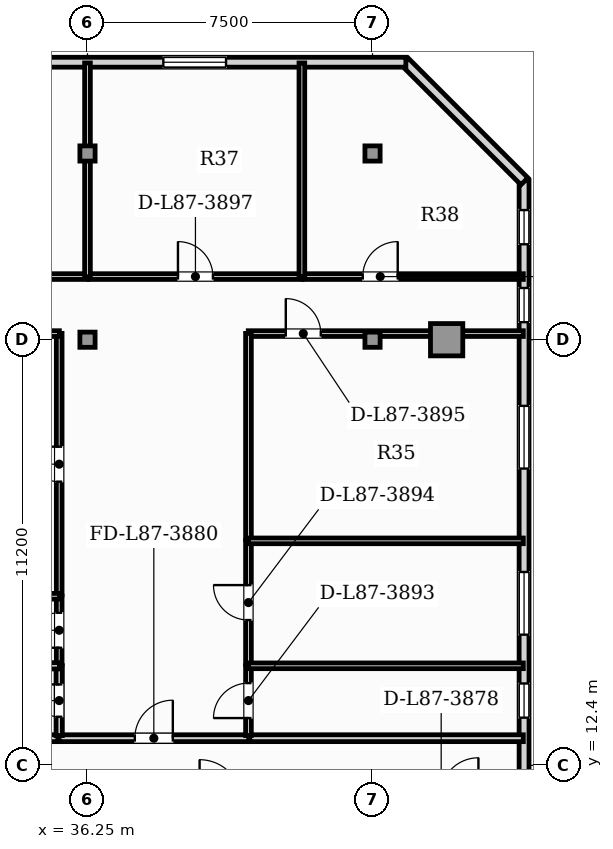
"""IFC4 building model, lengths in metres.
Left out: names, types, materials, properties, quantities, classifications, styles, units other than length and angle.
Written with IfcOpenShell. Run it as: python <this file> out.ifc"""

import sys

from ifc_helpers import new_model, si_unit, direction, frame, frame_2d, origin, origin_2d, place, context, subcontext, project, spatial, rectangle, hollow_rectangle, extrude, element, fill, save


model = new_model("IFC4")
c1 = context("Model", 3, precision=1e-05, world=origin(), true_north=direction((0.0, 1.0)))
c2 = subcontext(c1, "Body", "Model", "MODEL_VIEW")
j1 = project(units=[si_unit("LENGTHUNIT", "METRE"), si_unit("PLANEANGLEUNIT", "RADIAN")], contexts=[c1])
p1 = place(None, origin())
s1 = spatial("IfcSite", under=j1, at=p1, CompositionType="ELEMENT")
p2 = place(p1, origin())
s2 = spatial("IfcBuilding", under=s1, at=p2, CompositionType="ELEMENT")
p3 = place(p2, frame((0.0, 0.0, 353.45)))
s3 = spatial("IfcBuildingStorey", under=s2, at=p3, CompositionType="ELEMENT", Elevation=353.45)
p4 = place(p3, frame((45.7, 23.6, 0.0), z_axis=(0.0, 0.0, 1.0), x_axis=(1.0, 0.0, 0.0)))
e1 = element("IfcColumn", 1, at=p4, inside=s3, PredefinedType="USERDEFINED", context=c2, shape_type="SweptSolid", body=[
    extrude(hollow_rectangle(XDim=0.85, YDim=0.85, WallThickness=0.05, at=origin_2d()), origin(), (0.0, 0.0, 1.0), 4.4),
])
for number, where, z_axis, x_axis in (
    (2, (36.25, 23.6, 0.0), (0.0, 0.0, 1.0), (1.0, 0.0, 0.0)),
    (3, (43.75, 23.6, 0.0), (0.0, 0.0, 1.0), (1.0, 0.0, 0.0)),
    (4, (36.25, 28.5, 0.0), (0.0, 0.0, 1.0), (1.0, 0.0, 0.0)),
    (5, (43.75, 28.5, 0.0), (0.0, 0.0, 1.0), (1.0, 0.0, 0.0)),
):
    element("IfcColumn", number, at=place(p3, frame(where, z_axis=z_axis, x_axis=x_axis)), inside=s3, PredefinedType="COLUMN", context=c2, shape_type="SweptSolid", body=[
        extrude(hollow_rectangle(XDim=0.4, YDim=0.4, WallThickness=0.02, at=origin_2d()), origin(), (0.0, 0.0, 1.0), 4.4),
    ])
p5 = place(p3, frame((47.737, 3.24, 0.0), z_axis=(0.0, 0.0, 1.0), x_axis=(0.0, 1.0, 0.0)))
e6 = element("IfcWall", 6, at=p5, inside=s3, PredefinedType="SOLIDWALL", context=c2, shape_type="SweptSolid", body=[
    extrude(rectangle(XDim=24.551, YDim=0.26, at=frame_2d((12.276, 0.0))), origin(), (0.0, 0.0, 1.0), 4.14),
])
p6 = place(p5, frame((20.821, 0.0, 0.95)))
e7 = element("IfcOpeningElement", 7, at=p6, cuts=e6, PredefinedType="OPENING", context=c2, shape_type="SweptSolid", body=[
    extrude(rectangle(XDim=0.9, YDim=1.5, at=frame_2d((0.45, 0.75))), frame((0.0, 0.14, 0.0), z_axis=(0.0, -1.0, 0.0), x_axis=(1.0, 0.0, 0.0)), (0.0, 0.0, 1.0), 0.28),
])
p7 = place(p5, frame((10.415, 0.0, 0.95)))
e8 = element("IfcOpeningElement", 8, at=p7, cuts=e6, PredefinedType="OPENING", context=c2, shape_type="SweptSolid", body=[
    extrude(rectangle(XDim=0.9, YDim=1.5, at=frame_2d((0.45, 0.75))), frame((0.0, 0.14, 0.0), z_axis=(0.0, -1.0, 0.0), x_axis=(1.0, 0.0, 0.0)), (0.0, 0.0, 1.0), 0.28),
])
p8 = place(p5, frame((12.599, 0.0, 0.88)))
e9 = element("IfcOpeningElement", 9, at=p8, cuts=e6, PredefinedType="OPENING", context=c2, shape_type="SweptSolid", body=[
    extrude(rectangle(XDim=1.65, YDim=2.0, at=frame_2d((0.825, 1.0))), frame((0.0, 0.14, 0.0), z_axis=(0.0, -1.0, 0.0), x_axis=(1.0, 0.0, 0.0)), (0.0, 0.0, 1.0), 0.28),
])
p9 = place(p5, frame((16.969, 0.0, 0.88)))
e10 = element("IfcOpeningElement", 10, at=p9, cuts=e6, PredefinedType="OPENING", context=c2, shape_type="SweptSolid", body=[
    extrude(rectangle(XDim=1.65, YDim=2.0, at=frame_2d((0.825, 1.0))), frame((0.0, 0.14, 0.0), z_axis=(0.0, -1.0, 0.0), x_axis=(1.0, 0.0, 0.0)), (0.0, 0.0, 1.0), 0.28),
])
p10 = place(p5, frame((22.871, 0.0, 0.95)))
e11 = element("IfcOpeningElement", 11, at=p10, cuts=e6, PredefinedType="OPENING", context=c2, shape_type="SweptSolid", body=[
    extrude(rectangle(XDim=0.9, YDim=1.5, at=frame_2d((0.45, 0.75))), frame((0.0, 0.14, 0.0), z_axis=(0.0, -1.0, 0.0), x_axis=(1.0, 0.0, 0.0)), (0.0, 0.0, 1.0), 0.28),
])
p11 = place(p3, frame((47.747, 27.768, 0.0), z_axis=(0.0, 0.0, 1.0), x_axis=(-0.707134240044, 0.707079321262, 0.0)))
e12 = element("IfcWall", 12, at=p11, inside=s3, PredefinedType="SOLIDWALL", context=c2, shape_type="SweptSolid", body=[
    extrude(rectangle(XDim=4.446, YDim=0.26, at=frame_2d((2.223, 0.0))), origin(), (0.0, 0.0, 1.0), 4.14),
])
p12 = place(p3, frame((44.627, 30.901, 0.0), z_axis=(0.0, 0.0, 1.0), x_axis=(-1.0, 0.0, 0.0)))
e13 = element("IfcWall", 13, at=p12, inside=s3, PredefinedType="SOLIDWALL", context=c2, shape_type="SweptSolid", body=[
    extrude(rectangle(XDim=31.754, YDim=0.26, at=frame_2d((15.877, 0.0))), origin(), (0.0, 0.0, 1.0), 4.14),
])
p13 = place(p12, frame((29.334, 0.0, 0.88)))
e14 = element("IfcOpeningElement", 14, at=p13, cuts=e13, PredefinedType="OPENING", context=c2, shape_type="SweptSolid", body=[
    extrude(rectangle(XDim=1.65, YDim=2.0, at=frame_2d((0.825, 1.0))), frame((0.0, 0.14, 0.0), z_axis=(0.0, -1.0, 0.0), x_axis=(1.0, 0.0, 0.0)), (0.0, 0.0, 1.0), 0.28),
])
p14 = place(p12, frame((23.117, 0.0, 0.88)))
e15 = element("IfcOpeningElement", 15, at=p14, cuts=e13, PredefinedType="OPENING", context=c2, shape_type="SweptSolid", body=[
    extrude(rectangle(XDim=1.65, YDim=2.0, at=frame_2d((0.825, 1.0))), frame((0.0, 0.14, 0.0), z_axis=(0.0, -1.0, 0.0), x_axis=(1.0, 0.0, 0.0)), (0.0, 0.0, 1.0), 0.28),
])
p15 = place(p12, frame((17.469, 0.0, 0.88)))
e16 = element("IfcOpeningElement", 16, at=p15, cuts=e13, PredefinedType="OPENING", context=c2, shape_type="SweptSolid", body=[
    extrude(rectangle(XDim=1.65, YDim=2.0, at=frame_2d((0.825, 1.0))), frame((0.0, 0.14, 0.0), z_axis=(0.0, -1.0, 0.0), x_axis=(1.0, 0.0, 0.0)), (0.0, 0.0, 1.0), 0.28),
])
p16 = place(p12, frame((11.146, 0.0, 0.88)))
e17 = element("IfcOpeningElement", 17, at=p16, cuts=e13, PredefinedType="OPENING", context=c2, shape_type="SweptSolid", body=[
    extrude(rectangle(XDim=1.65, YDim=2.0, at=frame_2d((0.825, 1.0))), frame((0.0, 0.14, 0.0), z_axis=(0.0, -1.0, 0.0), x_axis=(1.0, 0.0, 0.0)), (0.0, 0.0, 1.0), 0.28),
])
p17 = place(p12, frame((4.732, 0.0, 0.88)))
e18 = element("IfcOpeningElement", 18, at=p17, cuts=e13, PredefinedType="OPENING", context=c2, shape_type="SweptSolid", body=[
    extrude(rectangle(XDim=1.65, YDim=2.0, at=frame_2d((0.825, 1.0))), frame((0.0, 0.14, 0.0), z_axis=(0.0, -1.0, 0.0), x_axis=(1.0, 0.0, 0.0)), (0.0, 0.0, 1.0), 0.28),
])
p18 = place(p3, frame((35.5, 13.115, 0.0), z_axis=(0.0, 0.0, 1.0), x_axis=(1.0, 0.0, 0.0)))
e19 = element("IfcWall", 19, at=p18, inside=s3, PredefinedType="PARTITIONING", context=c2, shape_type="SweptSolid", body=[
    extrude(rectangle(XDim=4.99, YDim=0.18, at=frame_2d((2.495, 0.0))), origin(), (0.0, 0.0, 1.0), 4.14),
])
p19 = place(p18, frame((1.995, 0.0, 0.0)))
e20 = element("IfcOpeningElement", 20, at=p19, cuts=e19, PredefinedType="OPENING", context=c2, shape_type="SweptSolid", body=[
    extrude(rectangle(XDim=1.0, YDim=2.15, at=frame_2d((0.5, 1.075))), frame((0.0, 0.1, 0.0), z_axis=(0.0, -1.0, 0.0), x_axis=(1.0, 0.0, 0.0)), (0.0, 0.0, 1.0), 0.2),
])
p20 = place(p3, frame((29.097, 13.115, 0.0), z_axis=(0.0, 0.0, 1.0), x_axis=(1.0, 0.0, 0.0)))
e21 = element("IfcWall", 21, at=p20, inside=s3, PredefinedType="PARTITIONING", context=c2, shape_type="SweptSolid", body=[
    extrude(rectangle(XDim=6.373, YDim=0.18, at=frame_2d((3.187, 0.0))), origin(), (0.0, 0.0, 1.0), 4.14),
])
p21 = place(p3, frame((40.521, 13.115, 0.0), z_axis=(0.0, 0.0, 1.0), x_axis=(1.0, 0.0, 0.0)))
e22 = element("IfcWall", 22, at=p21, inside=s3, PredefinedType="PARTITIONING", context=c2, shape_type="SweptSolid", body=[
    extrude(rectangle(XDim=7.197, YDim=0.18, at=frame_2d((3.599, 0.0))), origin(), (0.0, 0.0, 1.0), 4.14),
])
p22 = place(p3, frame((35.506, 13.185, 0.0), z_axis=(0.0, 0.0, 1.0), x_axis=(0.0, 1.0, 0.0)))
e23 = element("IfcWall", 23, at=p22, inside=s3, PredefinedType="PLUMBINGWALL", context=c2, shape_type="SweptSolid", body=[
    extrude(rectangle(XDim=1.84, YDim=0.165, at=frame_2d((0.92, 0.0))), origin(), (0.0, 0.0, 1.0), 4.14),
])
p23 = place(p22, frame((0.495, 0.0, 0.0)))
e24 = element("IfcOpeningElement", 24, at=p23, cuts=e23, PredefinedType="OPENING", context=c2, shape_type="SweptSolid", body=[
    extrude(rectangle(XDim=0.85, YDim=2.1, at=frame_2d((0.425, 1.05))), frame((0.0, 0.093, 0.0), z_axis=(0.0, -1.0, 0.0), x_axis=(1.0, 0.0, 0.0)), (0.0, 0.0, 1.0), 0.185),
])
p24 = place(p3, frame((35.506, 15.055, 0.0), z_axis=(0.0, 0.0, 1.0), x_axis=(0.0, 1.0, 0.0)))
e25 = element("IfcWall", 25, at=p24, inside=s3, PredefinedType="PARTITIONING", context=c2, shape_type="SweptSolid", body=[
    extrude(rectangle(XDim=1.8, YDim=0.15, at=frame_2d((0.9, 0.0))), origin(), (0.0, 0.0, 1.0), 4.14),
])
p25 = place(p24, frame((0.44, 0.0, 0.0)))
e26 = element("IfcOpeningElement", 26, at=p25, cuts=e25, PredefinedType="OPENING", context=c2, shape_type="SweptSolid", body=[
    extrude(rectangle(XDim=0.92, YDim=2.1, at=frame_2d((0.46, 1.05))), frame((0.0, 0.085, 0.0), z_axis=(0.0, -1.0, 0.0), x_axis=(1.0, 0.0, 0.0)), (0.0, 0.0, 1.0), 0.17),
])
p26 = place(p3, frame((35.506, 16.885, 0.0), z_axis=(0.0, 0.0, 1.0), x_axis=(0.0, 1.0, 0.0)))
e27 = element("IfcWall", 27, at=p26, inside=s3, PredefinedType="PARTITIONING", context=c2, shape_type="SweptSolid", body=[
    extrude(rectangle(XDim=6.881, YDim=0.15, at=frame_2d((3.44, 0.0))), origin(), (0.0, 0.0, 1.0), 4.14),
])
p27 = place(p26, frame((2.981, 0.0, 0.0)))
e28 = element("IfcOpeningElement", 28, at=p27, cuts=e27, PredefinedType="OPENING", context=c2, shape_type="SweptSolid", body=[
    extrude(rectangle(XDim=0.92, YDim=2.1, at=frame_2d((0.46, 1.05))), frame((0.0, 0.085, 0.0), z_axis=(0.0, -1.0, 0.0), x_axis=(1.0, 0.0, 0.0)), (0.0, 0.0, 1.0), 0.17),
])
p28 = place(p3, frame((29.097, 23.761, 0.0), z_axis=(0.0, 0.0, 1.0), x_axis=(1.0, 0.0, 0.0)))
e29 = element("IfcWall", 29, at=p28, inside=s3, PredefinedType="PARTITIONING", context=c2, shape_type="SweptSolid", body=[
    extrude(rectangle(XDim=6.413, YDim=0.15, at=frame_2d((3.207, 0.0))), origin(), (0.0, 0.0, 1.0), 3.24),
])
p29 = place(p3, frame((40.486, 13.185, 0.0), z_axis=(0.0, 0.0, 1.0), x_axis=(0.0, 1.0, 0.0)))
e30 = element("IfcWall", 30, at=p29, inside=s3, PredefinedType="PARTITIONING", context=c2, shape_type="SweptSolid", body=[
    extrude(rectangle(XDim=1.84, YDim=0.15, at=frame_2d((0.92, 0.0))), origin(), (0.0, 0.0, 1.0), 4.14),
])
p30 = place(p29, frame((0.46, 0.0, 0.0)))
e31 = element("IfcOpeningElement", 31, at=p30, cuts=e30, PredefinedType="OPENING", context=c2, shape_type="SweptSolid", body=[
    extrude(rectangle(XDim=0.92, YDim=2.1, at=frame_2d((0.46, 1.05))), frame((0.0, 0.085, 0.0), z_axis=(0.0, -1.0, 0.0), x_axis=(1.0, 0.0, 0.0)), (0.0, 0.0, 1.0), 0.17),
])
p31 = place(p3, frame((40.486, 15.055, 0.0), z_axis=(0.0, 0.0, 1.0), x_axis=(0.0, 1.0, 0.0)))
e32 = element("IfcWall", 32, at=p31, inside=s3, PredefinedType="PARTITIONING", context=c2, shape_type="SweptSolid", body=[
    extrude(rectangle(XDim=3.258, YDim=0.15, at=frame_2d((1.629, 0.0))), origin(), (0.0, 0.0, 1.0), 4.14),
])
p32 = place(p31, frame((1.169, 0.0, 0.0)))
e33 = element("IfcOpeningElement", 33, at=p32, cuts=e32, PredefinedType="OPENING", context=c2, shape_type="SweptSolid", body=[
    extrude(rectangle(XDim=0.92, YDim=2.1, at=frame_2d((0.46, 1.05))), frame((0.0, 0.085, 0.0), z_axis=(0.0, -1.0, 0.0), x_axis=(1.0, 0.0, 0.0)), (0.0, 0.0, 1.0), 0.17),
])
p33 = place(p3, frame((40.48, 23.761, 0.0), z_axis=(0.0, 0.0, 1.0), x_axis=(1.0, 0.0, 0.0)))
e34 = element("IfcWall", 34, at=p33, inside=s3, PredefinedType="PARTITIONING", context=c2, shape_type="SweptSolid", body=[
    extrude(rectangle(XDim=7.237, YDim=0.15, at=frame_2d((3.619, 0.0))), origin(), (0.0, 0.0, 1.0), 3.607),
])
p34 = place(p33, frame((0.987, 0.0, 0.0)))
e35 = element("IfcOpeningElement", 35, at=p34, cuts=e34, PredefinedType="OPENING", context=c2, shape_type="SweptSolid", body=[
    extrude(rectangle(XDim=0.92, YDim=2.1, at=frame_2d((0.46, 1.05))), frame((0.0, 0.085, 0.0), z_axis=(0.0, -1.0, 0.0), x_axis=(1.0, 0.0, 0.0)), (0.0, 0.0, 1.0), 0.17),
])
p35 = place(p3, frame((40.486, 18.343, 0.0), z_axis=(0.0, 0.0, 1.0), x_axis=(0.0, 1.0, 0.0)))
e36 = element("IfcWall", 36, at=p35, inside=s3, PredefinedType="PARTITIONING", context=c2, shape_type="SweptSolid", body=[
    extrude(rectangle(XDim=5.424, YDim=0.15, at=frame_2d((2.712, 0.0))), origin(), (0.0, 0.0, 1.0), 4.14),
])
p36 = place(p3, frame((29.097, 25.261, 0.0), z_axis=(0.0, 0.0, 1.0), x_axis=(1.0, 0.0, 0.0)))
e37 = element("IfcWall", 37, at=p36, inside=s3, PredefinedType="PARTITIONING", context=c2, shape_type="SweptSolid", body=[
    extrude(rectangle(XDim=7.158, YDim=0.15, at=frame_2d((3.579, 0.0))), origin(), (0.0, 0.0, 1.0), 4.14),
])
p37 = place(p36, frame((3.119, 0.0, 0.0)))
e38 = element("IfcOpeningElement", 38, at=p37, cuts=e37, PredefinedType="OPENING", context=c2, shape_type="SweptSolid", body=[
    extrude(rectangle(XDim=0.92, YDim=2.1, at=frame_2d((0.46, 1.05))), frame((0.0, 0.085, 0.0), z_axis=(0.0, -1.0, 0.0), x_axis=(1.0, 0.0, 0.0)), (0.0, 0.0, 1.0), 0.17),
])
p38 = place(p3, frame((36.285, 25.261, 0.0), z_axis=(0.0, 0.0, 1.0), x_axis=(1.0, 0.0, 0.0)))
e39 = element("IfcWall", 39, at=p38, inside=s3, PredefinedType="PARTITIONING", context=c2, shape_type="SweptSolid", body=[
    extrude(rectangle(XDim=5.611, YDim=0.15, at=frame_2d((2.806, 0.0))), origin(), (0.0, 0.0, 1.0), 4.14),
])
p39 = place(p38, frame((2.345, 0.0, 0.0)))
e40 = element("IfcOpeningElement", 40, at=p39, cuts=e39, PredefinedType="OPENING", context=c2, shape_type="SweptSolid", body=[
    extrude(rectangle(XDim=0.92, YDim=2.1, at=frame_2d((0.46, 1.05))), frame((0.0, 0.085, 0.0), z_axis=(0.0, -1.0, 0.0), x_axis=(1.0, 0.0, 0.0)), (0.0, 0.0, 1.0), 0.17),
])
p40 = place(p3, frame((41.926, 25.261, 0.0), z_axis=(0.0, 0.0, 1.0), x_axis=(1.0, 0.0, 0.0)))
e41 = element("IfcWall", 41, at=p40, inside=s3, PredefinedType="PARTITIONING", context=c2, shape_type="SweptSolid", body=[
    extrude(rectangle(XDim=5.792, YDim=0.15, at=frame_2d((2.896, 0.0))), origin(), (0.0, 0.0, 1.0), 4.14),
])
p41 = place(p40, frame((1.567, 0.0, 0.0)))
e42 = element("IfcOpeningElement", 42, at=p41, cuts=e41, PredefinedType="OPENING", context=c2, shape_type="SweptSolid", body=[
    extrude(rectangle(XDim=0.92, YDim=2.1, at=frame_2d((0.46, 1.05))), frame((0.0, 0.085, 0.0), z_axis=(0.0, -1.0, 0.0), x_axis=(1.0, 0.0, 0.0)), (0.0, 0.0, 1.0), 0.17),
])
p42 = place(p3, frame((29.097, 15.02, 0.0), z_axis=(0.0, 0.0, 1.0), x_axis=(1.0, 0.0, 0.0)))
e43 = element("IfcWall", 43, at=p42, inside=s3, PredefinedType="PLUMBINGWALL", context=c2, shape_type="SweptSolid", body=[
    extrude(rectangle(XDim=6.413, YDim=0.165, at=frame_2d((3.207, 0.0))), origin(), (0.0, 0.0, 1.0), 4.14),
])
p43 = place(p3, frame((29.057, 16.85, 0.0), z_axis=(0.0, 0.0, 1.0), x_axis=(1.0, 0.0, 0.0)))
e44 = element("IfcWall", 44, at=p43, inside=s3, PredefinedType="PARTITIONING", context=c2, shape_type="SweptSolid", body=[
    extrude(rectangle(XDim=6.453, YDim=0.15, at=frame_2d((3.227, 0.0))), origin(), (0.0, 0.0, 1.0), 4.14),
])
for number, where, z_axis, x_axis in (
    (45, (40.48, 15.02, 0.0), (0.0, 0.0, 1.0), (1.0, 0.0, 0.0)),
    (46, (40.48, 18.308, 0.0), (0.0, 0.0, 1.0), (1.0, 0.0, 0.0)),
):
    element("IfcWall", number, at=place(p3, frame(where, z_axis=z_axis, x_axis=x_axis)), inside=s3, PredefinedType="PARTITIONING", context=c2, shape_type="SweptSolid", body=[
        extrude(rectangle(XDim=7.237, YDim=0.15, at=frame_2d((3.619, 0.0))), origin(), (0.0, 0.0, 1.0), 4.14),
    ])
p44 = place(p3, frame((36.25, 25.256, 0.0), z_axis=(0.0, 0.0, 1.0), x_axis=(0.0, 1.0, 0.0)))
e47 = element("IfcWall", 47, at=p44, inside=s3, PredefinedType="PARTITIONING", context=c2, shape_type="SweptSolid", body=[
    extrude(rectangle(XDim=5.625, YDim=0.15, at=frame_2d((2.813, 0.0))), origin(), (0.0, 0.0, 1.0), 3.837),
])
p45 = place(p3, frame((41.891, 25.256, 0.0), z_axis=(0.0, 0.0, 1.0), x_axis=(0.0, 1.0, 0.0)))
e48 = element("IfcWall", 48, at=p45, inside=s3, PredefinedType="PARTITIONING", context=c2, shape_type="SweptSolid", body=[
    extrude(rectangle(XDim=5.625, YDim=0.15, at=frame_2d((2.813, 0.0))), origin(), (0.0, 0.0, 1.0), 4.14),
])
p46 = place(p6, origin())
e49 = element("IfcWindow", 49, at=p46, inside=s3, PartitioningType="SINGLE_PANEL", PredefinedType="WINDOW", context=c2, shape_type="SweptSolid", body=[
    extrude(rectangle(XDim=0.9, YDim=1.5, at=frame_2d((0.45, 0.75))), frame((0.0, 0.03, 0.0), z_axis=(0.0, -1.0, 0.0), x_axis=(1.0, 0.0, 0.0)), (0.0, 0.0, 1.0), 0.06),
])
fill(e7, e49)
p47 = place(p7, origin())
e50 = element("IfcWindow", 50, at=p47, inside=s3, PartitioningType="SINGLE_PANEL", PredefinedType="WINDOW", context=c2, shape_type="SweptSolid", body=[
    extrude(rectangle(XDim=0.9, YDim=1.5, at=frame_2d((0.45, 0.75))), frame((0.0, 0.03, 0.0), z_axis=(0.0, -1.0, 0.0), x_axis=(1.0, 0.0, 0.0)), (0.0, 0.0, 1.0), 0.06),
])
fill(e8, e50)
p48 = place(p8, origin())
e51 = element("IfcWindow", 51, at=p48, inside=s3, PartitioningType="SINGLE_PANEL", PredefinedType="WINDOW", context=c2, shape_type="SweptSolid", body=[
    extrude(rectangle(XDim=1.65, YDim=2.0, at=frame_2d((0.825, 1.0))), frame((0.0, 0.03, 0.0), z_axis=(0.0, -1.0, 0.0), x_axis=(1.0, 0.0, 0.0)), (0.0, 0.0, 1.0), 0.06),
])
fill(e9, e51)
p49 = place(p9, origin())
e52 = element("IfcWindow", 52, at=p49, inside=s3, PartitioningType="SINGLE_PANEL", PredefinedType="WINDOW", context=c2, shape_type="SweptSolid", body=[
    extrude(rectangle(XDim=1.65, YDim=2.0, at=frame_2d((0.825, 1.0))), frame((0.0, 0.03, 0.0), z_axis=(0.0, -1.0, 0.0), x_axis=(1.0, 0.0, 0.0)), (0.0, 0.0, 1.0), 0.06),
])
fill(e10, e52)
p50 = place(p17, origin())
e53 = element("IfcWindow", 53, at=p50, inside=s3, PartitioningType="SINGLE_PANEL", PredefinedType="WINDOW", context=c2, shape_type="SweptSolid", body=[
    extrude(rectangle(XDim=1.65, YDim=2.0, at=frame_2d((0.825, 1.0))), frame((0.0, 0.03, 0.0), z_axis=(0.0, -1.0, 0.0), x_axis=(1.0, 0.0, 0.0)), (0.0, 0.0, 1.0), 0.06),
])
fill(e18, e53)
p51 = place(p10, origin())
e54 = element("IfcWindow", 54, at=p51, inside=s3, PartitioningType="SINGLE_PANEL", PredefinedType="WINDOW", context=c2, shape_type="SweptSolid", body=[
    extrude(rectangle(XDim=0.9, YDim=1.5, at=frame_2d((0.45, 0.75))), frame((0.0, 0.03, 0.0), z_axis=(0.0, -1.0, 0.0), x_axis=(1.0, 0.0, 0.0)), (0.0, 0.0, 1.0), 0.06),
])
fill(e11, e54)
p52 = place(p19, origin())
e55 = element("IfcDoor", 55, at=p52, inside=s3, OperationType="SINGLE_SWING_RIGHT", PredefinedType="DOOR", context=c2, shape_type="SweptSolid", body=[
    extrude(rectangle(XDim=1.0, YDim=2.15, at=frame_2d((0.5, 1.075))), frame((0.0, 0.025, 0.0), z_axis=(0.0, -1.0, 0.0), x_axis=(1.0, 0.0, 0.0)), (0.0, 0.0, 1.0), 0.05),
])
fill(e20, e55)
p53 = place(p23, origin())
e56 = element("IfcDoor", 56, at=p53, inside=s3, OperationType="SINGLE_SWING_RIGHT", PredefinedType="DOOR", context=c2, shape_type="SweptSolid", body=[
    extrude(rectangle(XDim=0.85, YDim=2.1, at=frame_2d((0.425, 1.05))), frame((0.0, 0.025, 0.0), z_axis=(0.0, -1.0, 0.0), x_axis=(1.0, 0.0, 0.0)), (0.0, 0.0, 1.0), 0.05),
])
fill(e24, e56)
p54 = place(p25, origin())
e57 = element("IfcDoor", 57, at=p54, inside=s3, OperationType="SINGLE_SWING_LEFT", PredefinedType="DOOR", context=c2, shape_type="SweptSolid", body=[
    extrude(rectangle(XDim=0.92, YDim=2.1, at=frame_2d((0.46, 1.05))), frame((0.0, 0.025, 0.0), z_axis=(0.0, -1.0, 0.0), x_axis=(1.0, 0.0, 0.0)), (0.0, 0.0, 1.0), 0.05),
])
fill(e26, e57)
p55 = place(p27, origin())
e58 = element("IfcDoor", 58, at=p55, inside=s3, OperationType="SINGLE_SWING_RIGHT", PredefinedType="DOOR", context=c2, shape_type="SweptSolid", body=[
    extrude(rectangle(XDim=0.92, YDim=2.1, at=frame_2d((0.46, 1.05))), frame((0.0, 0.025, 0.0), z_axis=(0.0, -1.0, 0.0), x_axis=(1.0, 0.0, 0.0)), (0.0, 0.0, 1.0), 0.05),
])
fill(e28, e58)
p56 = place(p30, origin())
e59 = element("IfcDoor", 59, at=p56, inside=s3, OperationType="SINGLE_SWING_LEFT", PredefinedType="DOOR", context=c2, shape_type="SweptSolid", body=[
    extrude(rectangle(XDim=0.92, YDim=2.1, at=frame_2d((0.46, 1.05))), frame((0.0, 0.025, 0.0), z_axis=(0.0, -1.0, 0.0), x_axis=(1.0, 0.0, 0.0)), (0.0, 0.0, 1.0), 0.05),
])
fill(e31, e59)
p57 = place(p32, origin())
e60 = element("IfcDoor", 60, at=p57, inside=s3, OperationType="SINGLE_SWING_RIGHT", PredefinedType="DOOR", context=c2, shape_type="SweptSolid", body=[
    extrude(rectangle(XDim=0.92, YDim=2.1, at=frame_2d((0.46, 1.05))), frame((0.0, 0.025, 0.0), z_axis=(0.0, -1.0, 0.0), x_axis=(1.0, 0.0, 0.0)), (0.0, 0.0, 1.0), 0.05),
])
fill(e33, e60)
p58 = place(p34, origin())
e61 = element("IfcDoor", 61, at=p58, inside=s3, OperationType="SINGLE_SWING_LEFT", PredefinedType="DOOR", context=c2, shape_type="SweptSolid", body=[
    extrude(rectangle(XDim=0.92, YDim=2.1, at=frame_2d((0.46, 1.05))), frame((0.0, 0.025, 0.0), z_axis=(0.0, -1.0, 0.0), x_axis=(1.0, 0.0, 0.0)), (0.0, 0.0, 1.0), 0.05),
])
fill(e35, e61)
p59 = place(p39, origin())
e62 = element("IfcDoor", 62, at=p59, inside=s3, OperationType="SINGLE_SWING_LEFT", PredefinedType="DOOR", context=c2, shape_type="SweptSolid", body=[
    extrude(rectangle(XDim=0.92, YDim=2.1, at=frame_2d((0.46, 1.05))), frame((0.0, 0.025, 0.0), z_axis=(0.0, -1.0, 0.0), x_axis=(1.0, 0.0, 0.0)), (0.0, 0.0, 1.0), 0.05),
])
fill(e40, e62)
p60 = place(p41, origin())
e63 = element("IfcDoor", 63, at=p60, inside=s3, OperationType="SINGLE_SWING_RIGHT", PredefinedType="DOOR", context=c2, shape_type="SweptSolid", body=[
    extrude(rectangle(XDim=0.92, YDim=2.1, at=frame_2d((0.46, 1.05))), frame((0.0, 0.025, 0.0), z_axis=(0.0, -1.0, 0.0), x_axis=(1.0, 0.0, 0.0)), (0.0, 0.0, 1.0), 0.05),
])
fill(e42, e63)
save(model, sys.argv[1])
